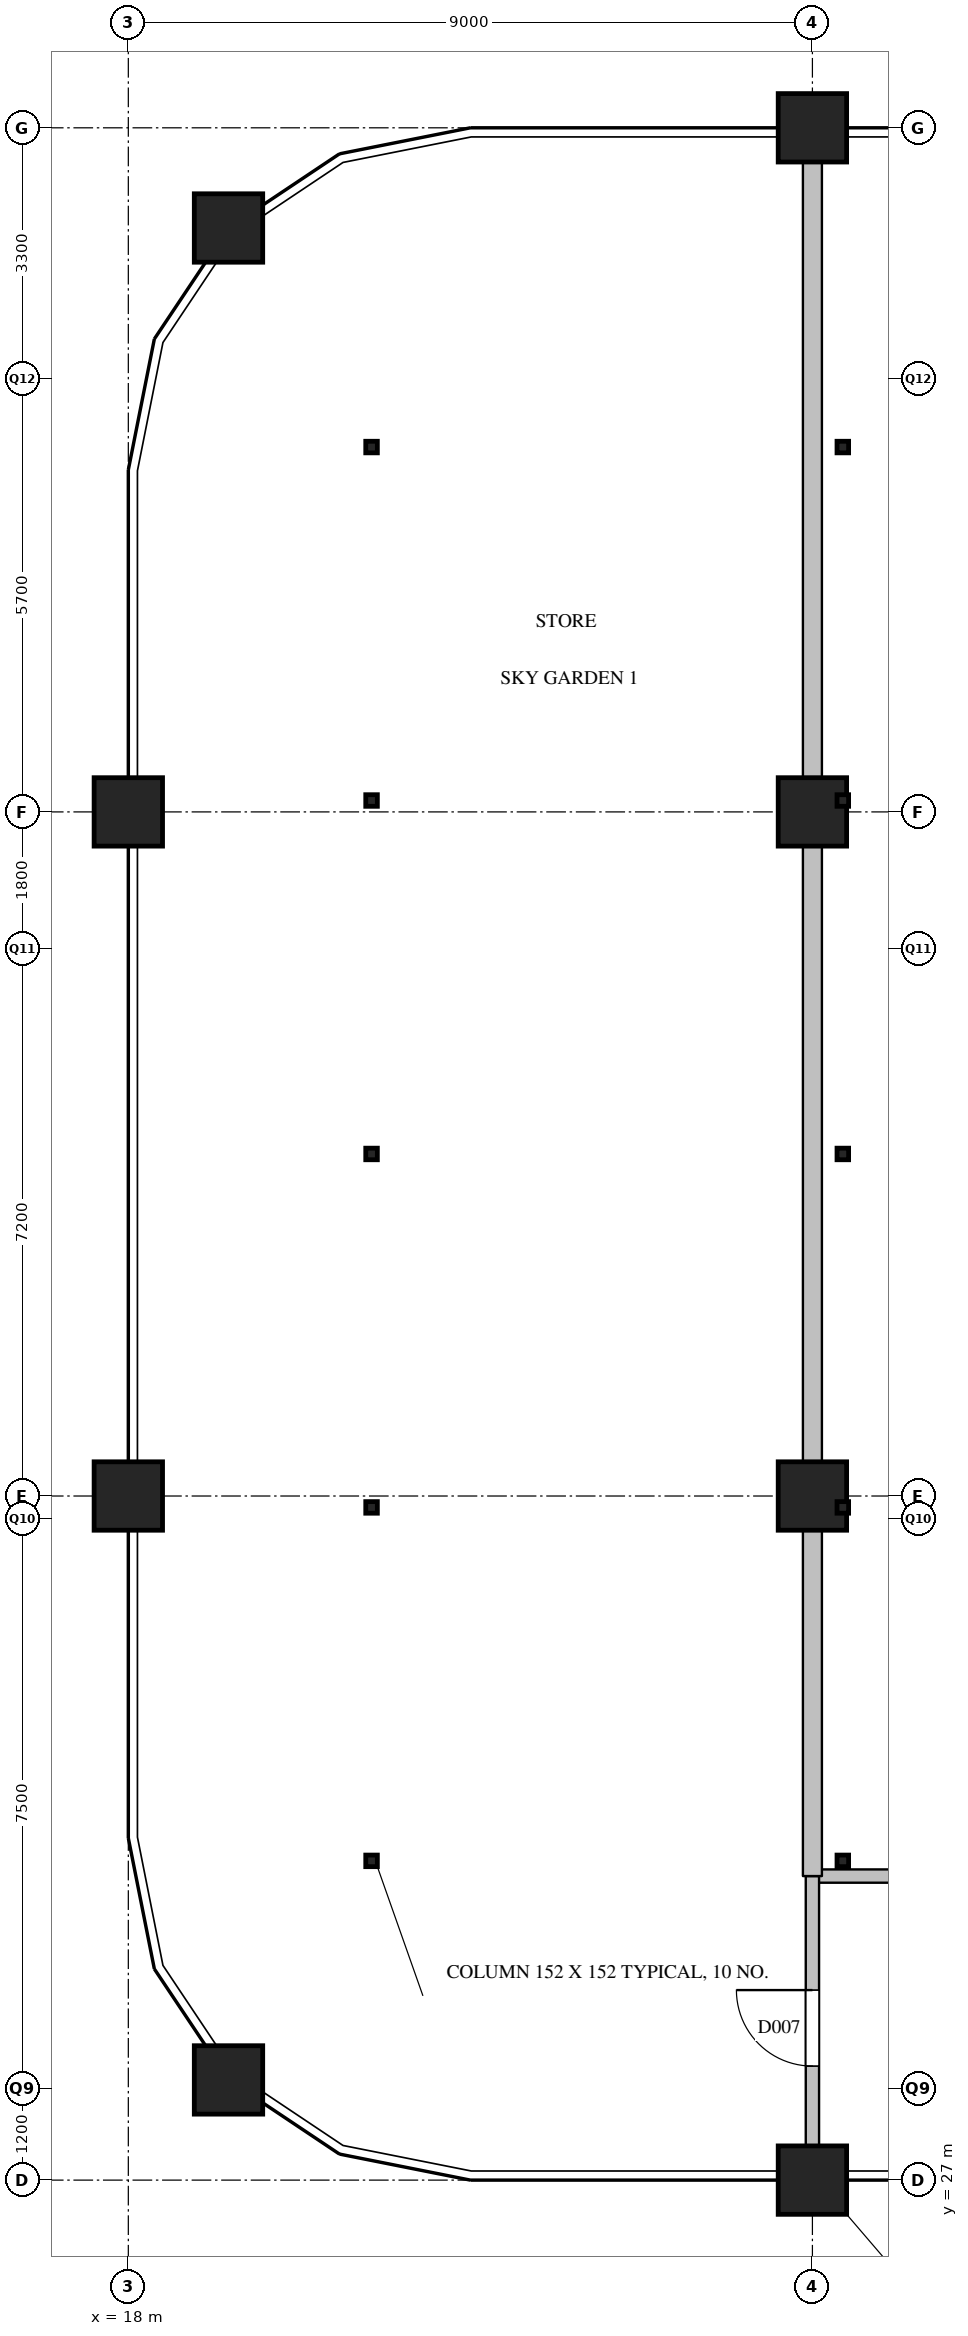
"""IFC4 building model, lengths in metres.
Left out: names, types, materials, properties, quantities, classifications, styles, units other than length and angle.
Written with IfcOpenShell. Run it as: python <this file> out.ifc"""

import sys

from ifc_helpers import new_model, si_unit, direction, frame, frame_2d, origin, origin_2d, place, context, subcontext, project, spatial, rectangle, hollow_rectangle, extrude, element, fill, save


model = new_model("IFC4")
c1 = context("Model", 3, precision=1e-05, world=origin(), true_north=direction((0.0, 1.0)))
c2 = subcontext(c1, "Body", "Model", "MODEL_VIEW")
j1 = project(units=[si_unit("LENGTHUNIT", "METRE"), si_unit("PLANEANGLEUNIT", "RADIAN")], contexts=[c1])
p1 = place(None, origin())
s1 = spatial("IfcSite", under=j1, at=p1, CompositionType="ELEMENT")
p2 = place(p1, origin())
s2 = spatial("IfcBuilding", under=s1, at=p2, CompositionType="ELEMENT")
p3 = place(p2, frame((0.0, 0.0, 320.7)))
s3 = spatial("IfcBuildingStorey", under=s2, at=p3, CompositionType="ELEMENT", Elevation=320.7)
for number, where, z_axis, x_axis in (
    (1, (19.318, 28.318, 0.0), (0.0, 0.0, 1.0), (1.0, 0.0, 0.0)),
    (2, (18.0, 36.0, 0.0), (0.0, 0.0, 1.0), (1.0, 0.0, 0.0)),
    (3, (18.0, 45.0, 0.0), (0.0, 0.0, 1.0), (1.0, 0.0, 0.0)),
    (4, (19.318, 52.682, 0.0), (0.0, 0.0, 1.0), (1.0, 0.0, 0.0)),
    (5, (27.0, 27.0, 0.0), (0.0, 0.0, 1.0), (1.0, 0.0, 0.0)),
    (6, (27.0, 36.0, 0.0), (0.0, 0.0, 1.0), (1.0, 0.0, 0.0)),
    (7, (27.0, 45.0, 0.0), (0.0, 0.0, 1.0), (1.0, 0.0, 0.0)),
    (8, (27.0, 54.0, 0.0), (0.0, 0.0, 1.0), (1.0, 0.0, 0.0)),
):
    element("IfcColumn", number, at=place(p3, frame(where, z_axis=z_axis, x_axis=x_axis)), inside=s3, PredefinedType="COLUMN", context=c2, shape_type="SweptSolid", body=[
        extrude(rectangle(XDim=0.9, YDim=0.9, at=origin_2d()), origin(), (0.0, 0.0, 1.0), 4.5),
    ])
for number, where, z_axis, x_axis in (
    (9, (21.2, 31.2, 4.5), (0.0, 0.0, 1.0), (1.0, 0.0, 0.0)),
    (10, (21.2, 35.85, 4.5), (0.0, 0.0, 1.0), (1.0, 0.0, 0.0)),
    (11, (21.2, 40.5, 4.5), (0.0, 0.0, 1.0), (1.0, 0.0, 0.0)),
    (12, (21.2, 45.15, 4.5), (0.0, 0.0, 1.0), (1.0, 0.0, 0.0)),
    (13, (21.2, 49.8, 4.5), (0.0, 0.0, 1.0), (1.0, 0.0, 0.0)),
    (14, (27.4, 31.2, 4.5), (0.0, 0.0, 1.0), (1.0, 0.0, 0.0)),
    (15, (27.4, 35.85, 4.5), (0.0, 0.0, 1.0), (1.0, 0.0, 0.0)),
    (16, (27.4, 40.5, 4.5), (0.0, 0.0, 1.0), (1.0, 0.0, 0.0)),
    (17, (27.4, 45.15, 4.5), (0.0, 0.0, 1.0), (1.0, 0.0, 0.0)),
    (18, (27.4, 49.8, 4.5), (0.0, 0.0, 1.0), (1.0, 0.0, 0.0)),
):
    element("IfcColumn", number, at=place(p3, frame(where, z_axis=z_axis, x_axis=x_axis)), inside=s3, PredefinedType="COLUMN", context=c2, shape_type="SweptSolid", body=[
        extrude(hollow_rectangle(XDim=0.152, YDim=0.152, WallThickness=0.006, at=origin_2d()), origin(), (0.0, 0.0, 1.0), 3.4),
    ])
p4 = place(p3, frame((27.0, 31.0, 0.0), z_axis=(0.0, 0.0, 1.0), x_axis=(1.0, 0.0, 0.0)))
e19 = element("IfcWall", 19, at=p4, inside=s3, PredefinedType="PARTITIONING", context=c2, shape_type="SweptSolid", body=[
    extrude(rectangle(XDim=9.0, YDim=0.175, at=frame_2d((4.5, 0.0))), origin(), (0.0, 0.0, 1.0), 2.95),
])
p5 = place(p4, frame((7.6, 0.0, 0.0)))
e20 = element("IfcOpeningElement", 20, at=p5, cuts=e19, PredefinedType="OPENING", context=c2, shape_type="SweptSolid", body=[
    extrude(rectangle(XDim=1.0, YDim=2.1, at=frame_2d((0.5, 1.05))), frame((0.0, 0.097, 0.0), z_axis=(0.0, -1.0, 0.0), x_axis=(1.0, 0.0, 0.0)), (0.0, 0.0, 1.0), 0.195),
])
p6 = place(p3, frame((27.0, 27.0, 0.0), z_axis=(0.0, 0.0, 1.0), x_axis=(0.0, 1.0, 0.0)))
e21 = element("IfcWall", 21, at=p6, inside=s3, PredefinedType="PARTITIONING", context=c2, shape_type="SweptSolid", body=[
    extrude(rectangle(XDim=4.0, YDim=0.175, at=frame_2d((2.0, 0.0))), origin(), (0.0, 0.0, 1.0), 2.95),
])
p7 = place(p6, frame((1.5, 0.0, 0.0)))
e22 = element("IfcOpeningElement", 22, at=p7, cuts=e21, PredefinedType="OPENING", context=c2, shape_type="SweptSolid", body=[
    extrude(rectangle(XDim=1.0, YDim=2.1, at=frame_2d((0.5, 1.05))), frame((0.0, 0.097, 0.0), z_axis=(0.0, -1.0, 0.0), x_axis=(1.0, 0.0, 0.0)), (0.0, 0.0, 1.0), 0.195),
])
p8 = place(p3, frame((27.0, 31.0, 0.0), z_axis=(0.0, 0.0, 1.0), x_axis=(0.0, 1.0, 0.0)))
e23 = element("IfcWall", 23, at=p8, inside=s3, PredefinedType="PARTITIONING", context=c2, shape_type="SweptSolid", body=[
    extrude(rectangle(XDim=23.0, YDim=0.25, at=frame_2d((11.5, 0.0))), origin(), (0.0, 0.0, 1.0), 2.95),
])
p9 = place(p7, origin())
e24 = element("IfcDoor", 24, at=p9, inside=s3, OperationType="SINGLE_SWING_RIGHT", PredefinedType="DOOR", context=c2, shape_type="SweptSolid", body=[
    extrude(rectangle(XDim=1.0, YDim=2.1, at=frame_2d((0.5, 1.05))), frame((0.0, 0.025, 0.0), z_axis=(0.0, -1.0, 0.0), x_axis=(1.0, 0.0, 0.0)), (0.0, 0.0, 1.0), 0.05),
])
fill(e22, e24)
save(model, sys.argv[1])
